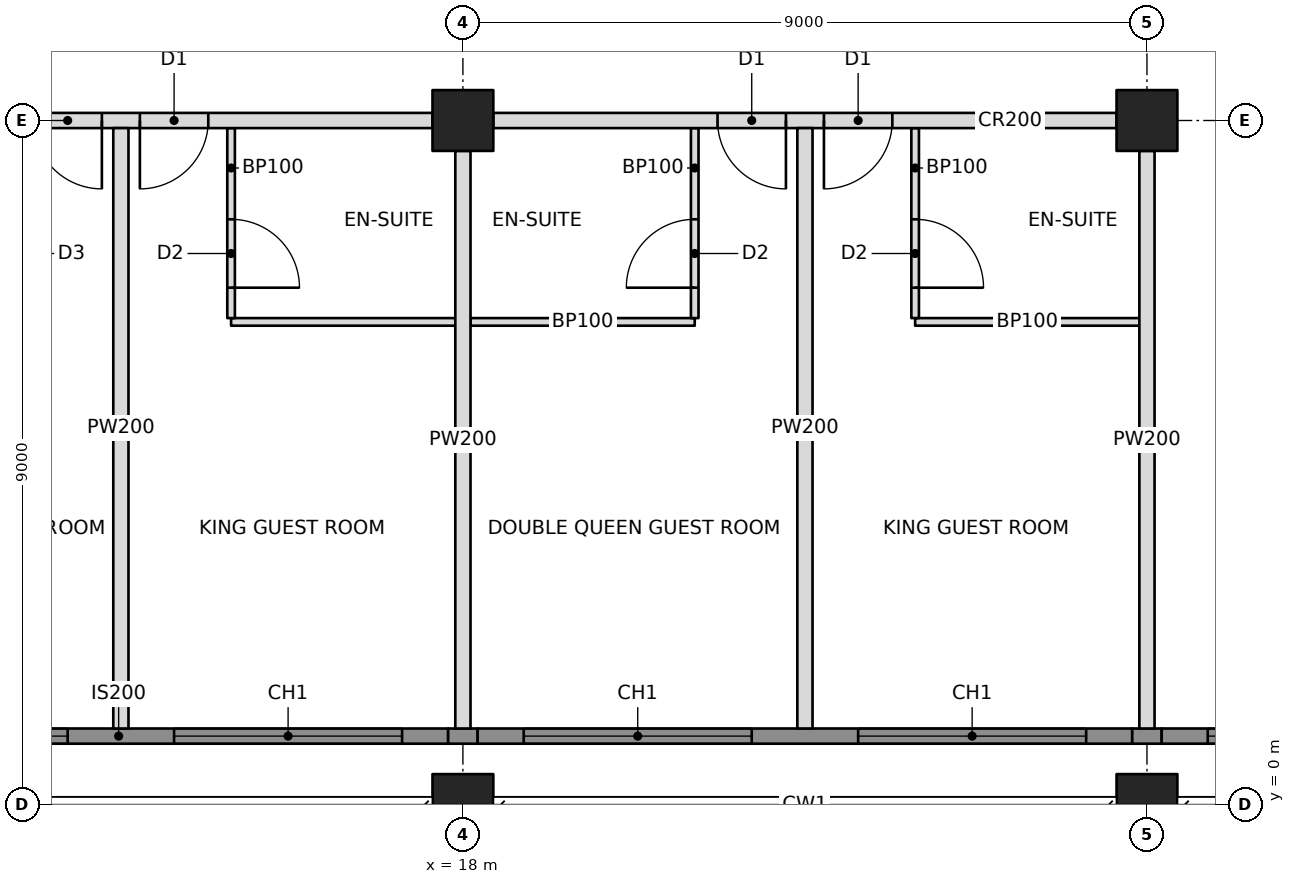
"""IFC4 building model, lengths in metres.
Left out: names, types, materials, properties, quantities, classifications, styles, units other than length and angle.
Written with IfcOpenShell. Run it as: python <this file> out.ifc"""

import sys

from ifc_helpers import new_model, si_unit, direction, frame, frame_2d, origin, origin_2d, place, context, subcontext, project, spatial, rectangle, hollow_rectangle, extrude, element, fill, save


model = new_model("IFC4")
c1 = context("Model", 3, precision=1e-05, world=origin(), true_north=direction((0.0, 1.0)))
c2 = subcontext(c1, "Body", "Model", "MODEL_VIEW")
j1 = project(units=[si_unit("LENGTHUNIT", "METRE"), si_unit("PLANEANGLEUNIT", "RADIAN")], contexts=[c1])
p1 = place(None, origin())
s1 = spatial("IfcSite", under=j1, at=p1, CompositionType="ELEMENT")
p2 = place(p1, origin())
s2 = spatial("IfcBuilding", under=s1, at=p2, CompositionType="ELEMENT")
p3 = place(p2, frame((0.0, 0.0, 167.2)))
s3 = spatial("IfcBuildingStorey", under=s2, at=p3, CompositionType="ELEMENT", Elevation=167.2)
p4 = place(p3, frame((18.0, 0.0, 0.0), z_axis=(0.0, 0.0, 1.0), x_axis=(1.0, 0.0, 0.0)))
e1 = element("IfcColumn", 1, at=p4, inside=s3, PredefinedType="COLUMN", context=c2, shape_type="SweptSolid", body=[
    extrude(hollow_rectangle(XDim=0.8, YDim=0.8, WallThickness=0.07, at=origin_2d()), origin(), (0.0, 0.0, 1.0), 3.4),
])
p5 = place(p3, frame((18.0, 9.0, 0.0), z_axis=(0.0, 0.0, 1.0), x_axis=(1.0, 0.0, 0.0)))
e2 = element("IfcColumn", 2, at=p5, inside=s3, PredefinedType="COLUMN", context=c2, shape_type="SweptSolid", body=[
    extrude(hollow_rectangle(XDim=0.8, YDim=0.8, WallThickness=0.06, at=origin_2d()), origin(), (0.0, 0.0, 1.0), 3.4),
])
p6 = place(p3, frame((27.0, 0.0, 0.0), z_axis=(0.0, 0.0, 1.0), x_axis=(1.0, 0.0, 0.0)))
e3 = element("IfcColumn", 3, at=p6, inside=s3, PredefinedType="COLUMN", context=c2, shape_type="SweptSolid", body=[
    extrude(hollow_rectangle(XDim=0.8, YDim=0.8, WallThickness=0.07, at=origin_2d()), origin(), (0.0, 0.0, 1.0), 3.4),
])
p7 = place(p3, frame((27.0, 9.0, 0.0), z_axis=(0.0, 0.0, 1.0), x_axis=(1.0, 0.0, 0.0)))
e4 = element("IfcColumn", 4, at=p7, inside=s3, PredefinedType="COLUMN", context=c2, shape_type="SweptSolid", body=[
    extrude(hollow_rectangle(XDim=0.8, YDim=0.8, WallThickness=0.06, at=origin_2d()), origin(), (0.0, 0.0, 1.0), 3.4),
])
p8 = place(p3, frame((9.4, 9.0, 0.0), z_axis=(0.0, 0.0, 1.0), x_axis=(1.0, 0.0, 0.0)))
e5 = element("IfcWall", 5, at=p8, inside=s3, PredefinedType="PARTITIONING", context=c2, shape_type="SweptSolid", body=[
    extrude(rectangle(XDim=8.2, YDim=0.2, at=frame_2d((4.1, 0.0))), origin(), (0.0, 0.0, 1.0), 2.405),
])
p9 = place(p8, frame((2.95, 0.0, 0.0)))
e6 = element("IfcOpeningElement", 6, at=p9, cuts=e5, PredefinedType="OPENING", context=c2, shape_type="SweptSolid", body=[
    extrude(rectangle(XDim=0.9, YDim=2.1, at=frame_2d((0.45, 1.05))), frame((0.0, 0.11, 0.0), z_axis=(0.0, -1.0, 0.0), x_axis=(1.0, 0.0, 0.0)), (0.0, 0.0, 1.0), 0.22),
])
p10 = place(p8, frame((4.35, 0.0, 0.0)))
e7 = element("IfcOpeningElement", 7, at=p10, cuts=e5, PredefinedType="OPENING", context=c2, shape_type="SweptSolid", body=[
    extrude(rectangle(XDim=0.9, YDim=2.1, at=frame_2d((0.45, 1.05))), frame((0.0, 0.11, 0.0), z_axis=(0.0, -1.0, 0.0), x_axis=(1.0, 0.0, 0.0)), (0.0, 0.0, 1.0), 0.22),
])
p11 = place(p3, frame((18.4, 9.0, 0.0), z_axis=(0.0, 0.0, 1.0), x_axis=(1.0, 0.0, 0.0)))
e8 = element("IfcWall", 8, at=p11, inside=s3, PredefinedType="PARTITIONING", context=c2, shape_type="SweptSolid", body=[
    extrude(rectangle(XDim=8.2, YDim=0.2, at=frame_2d((4.1, 0.0))), origin(), (0.0, 0.0, 1.0), 2.405),
])
p12 = place(p11, frame((2.95, 0.0, 0.0)))
e9 = element("IfcOpeningElement", 9, at=p12, cuts=e8, PredefinedType="OPENING", context=c2, shape_type="SweptSolid", body=[
    extrude(rectangle(XDim=0.9, YDim=2.1, at=frame_2d((0.45, 1.05))), frame((0.0, 0.11, 0.0), z_axis=(0.0, -1.0, 0.0), x_axis=(1.0, 0.0, 0.0)), (0.0, 0.0, 1.0), 0.22),
])
p13 = place(p11, frame((4.35, 0.0, 0.0)))
e10 = element("IfcOpeningElement", 10, at=p13, cuts=e8, PredefinedType="OPENING", context=c2, shape_type="SweptSolid", body=[
    extrude(rectangle(XDim=0.9, YDim=2.1, at=frame_2d((0.45, 1.05))), frame((0.0, 0.11, 0.0), z_axis=(0.0, -1.0, 0.0), x_axis=(1.0, 0.0, 0.0)), (0.0, 0.0, 1.0), 0.22),
])
p14 = place(p3, frame((13.5, 8.9, 0.0), z_axis=(0.0, 0.0, 1.0), x_axis=(0.0, -1.0, 0.0)))
e11 = element("IfcWall", 11, at=p14, inside=s3, PredefinedType="PARTITIONING", context=c2, shape_type="SweptSolid", body=[
    extrude(rectangle(XDim=7.9, YDim=0.2, at=frame_2d((3.95, 0.0))), origin(), (0.0, 0.0, 1.0), 2.404),
])
p15 = place(p3, frame((18.0, 8.6, 0.0), z_axis=(0.0, 0.0, 1.0), x_axis=(0.0, -1.0, 0.0)))
e12 = element("IfcWall", 12, at=p15, inside=s3, PredefinedType="PARTITIONING", context=c2, shape_type="SweptSolid", body=[
    extrude(rectangle(XDim=7.6, YDim=0.2, at=frame_2d((3.8, 0.0))), origin(), (0.0, 0.0, 1.0), 2.405),
])
p16 = place(p3, frame((22.5, 8.9, 0.0), z_axis=(0.0, 0.0, 1.0), x_axis=(0.0, -1.0, 0.0)))
e13 = element("IfcWall", 13, at=p16, inside=s3, PredefinedType="PARTITIONING", context=c2, shape_type="SweptSolid", body=[
    extrude(rectangle(XDim=7.9, YDim=0.2, at=frame_2d((3.95, 0.0))), origin(), (0.0, 0.0, 1.0), 2.404),
])
p17 = place(p3, frame((27.0, 8.6, 0.0), z_axis=(0.0, 0.0, 1.0), x_axis=(0.0, -1.0, 0.0)))
e14 = element("IfcWall", 14, at=p17, inside=s3, PredefinedType="PARTITIONING", context=c2, shape_type="SweptSolid", body=[
    extrude(rectangle(XDim=7.6, YDim=0.2, at=frame_2d((3.8, 0.0))), origin(), (0.0, 0.0, 1.0), 2.405),
])
p18 = place(p3, frame((14.95, 6.35, 0.0), z_axis=(0.0, 0.0, 1.0), x_axis=(1.0, 0.0, 0.0)))
e15 = element("IfcWall", 15, at=p18, inside=s3, PredefinedType="PARTITIONING", context=c2, shape_type="SweptSolid", body=[
    extrude(rectangle(XDim=2.95, YDim=0.1, at=frame_2d((1.475, 0.0))), origin(), (0.0, 0.0, 1.0), 2.404),
])
p19 = place(p3, frame((14.95, 8.9, 0.0), z_axis=(0.0, 0.0, 1.0), x_axis=(0.0, -1.0, 0.0)))
e16 = element("IfcWall", 16, at=p19, inside=s3, PredefinedType="PARTITIONING", context=c2, shape_type="SweptSolid", body=[
    extrude(rectangle(XDim=2.5, YDim=0.1, at=frame_2d((1.25, 0.0))), origin(), (0.0, 0.0, 1.0), 2.404),
])
p20 = place(p19, frame((1.2, 0.0, 0.0)))
e17 = element("IfcOpeningElement", 17, at=p20, cuts=e16, PredefinedType="OPENING", context=c2, shape_type="SweptSolid", body=[
    extrude(rectangle(XDim=0.9, YDim=2.1, at=frame_2d((0.45, 1.05))), frame((0.0, 0.06, 0.0), z_axis=(0.0, -1.0, 0.0), x_axis=(1.0, 0.0, 0.0)), (0.0, 0.0, 1.0), 0.12),
])
p21 = place(p3, frame((18.1, 6.35, 0.0), z_axis=(0.0, 0.0, 1.0), x_axis=(1.0, 0.0, 0.0)))
e18 = element("IfcWall", 18, at=p21, inside=s3, PredefinedType="PARTITIONING", context=c2, shape_type="SweptSolid", body=[
    extrude(rectangle(XDim=2.95, YDim=0.1, at=frame_2d((1.475, 0.0))), origin(), (0.0, 0.0, 1.0), 2.404),
])
p22 = place(p3, frame((21.05, 8.9, 0.0), z_axis=(0.0, 0.0, 1.0), x_axis=(0.0, -1.0, 0.0)))
e19 = element("IfcWall", 19, at=p22, inside=s3, PredefinedType="PARTITIONING", context=c2, shape_type="SweptSolid", body=[
    extrude(rectangle(XDim=2.5, YDim=0.1, at=frame_2d((1.25, 0.0))), origin(), (0.0, 0.0, 1.0), 2.404),
])
p23 = place(p22, frame((1.2, 0.0, 0.0)))
e20 = element("IfcOpeningElement", 20, at=p23, cuts=e19, PredefinedType="OPENING", context=c2, shape_type="SweptSolid", body=[
    extrude(rectangle(XDim=0.9, YDim=2.1, at=frame_2d((0.45, 1.05))), frame((0.0, 0.06, 0.0), z_axis=(0.0, -1.0, 0.0), x_axis=(1.0, 0.0, 0.0)), (0.0, 0.0, 1.0), 0.12),
])
p24 = place(p3, frame((23.95, 6.35, 0.0), z_axis=(0.0, 0.0, 1.0), x_axis=(1.0, 0.0, 0.0)))
e21 = element("IfcWall", 21, at=p24, inside=s3, PredefinedType="PARTITIONING", context=c2, shape_type="SweptSolid", body=[
    extrude(rectangle(XDim=2.95, YDim=0.1, at=frame_2d((1.475, 0.0))), origin(), (0.0, 0.0, 1.0), 2.404),
])
p25 = place(p3, frame((23.95, 8.9, 0.0), z_axis=(0.0, 0.0, 1.0), x_axis=(0.0, -1.0, 0.0)))
e22 = element("IfcWall", 22, at=p25, inside=s3, PredefinedType="PARTITIONING", context=c2, shape_type="SweptSolid", body=[
    extrude(rectangle(XDim=2.5, YDim=0.1, at=frame_2d((1.25, 0.0))), origin(), (0.0, 0.0, 1.0), 2.404),
])
p26 = place(p25, frame((1.2, 0.0, 0.0)))
e23 = element("IfcOpeningElement", 23, at=p26, cuts=e22, PredefinedType="OPENING", context=c2, shape_type="SweptSolid", body=[
    extrude(rectangle(XDim=0.9, YDim=2.1, at=frame_2d((0.45, 1.05))), frame((0.0, 0.06, 0.0), z_axis=(0.0, -1.0, 0.0), x_axis=(1.0, 0.0, 0.0)), (0.0, 0.0, 1.0), 0.12),
])
p27 = place(p3, frame((9.135, 0.9, 0.0), z_axis=(0.0, 0.0, 1.0), x_axis=(1.0, 0.0, 0.0)))
e24 = element("IfcWall", 24, at=p27, inside=s3, PredefinedType="SOLIDWALL", context=c2, shape_type="SweptSolid", body=[
    extrude(rectangle(XDim=8.671, YDim=0.2, at=frame_2d((4.335, 0.0))), origin(), (0.0, 0.0, 1.0), 3.2),
])
p28 = place(p27, frame((0.665, 0.0, 0.6)))
e25 = element("IfcOpeningElement", 25, at=p28, cuts=e24, PredefinedType="OPENING", context=c2, shape_type="SweptSolid", body=[
    extrude(rectangle(XDim=3.0, YDim=2.2, at=frame_2d((1.5, 1.1))), frame((0.0, 0.11, 0.0), z_axis=(0.0, -1.0, 0.0), x_axis=(1.0, 0.0, 0.0)), (0.0, 0.0, 1.0), 0.22),
])
p29 = place(p27, frame((5.065, 0.0, 0.6)))
e26 = element("IfcOpeningElement", 26, at=p29, cuts=e24, PredefinedType="OPENING", context=c2, shape_type="SweptSolid", body=[
    extrude(rectangle(XDim=3.0, YDim=2.2, at=frame_2d((1.5, 1.1))), frame((0.0, 0.11, 0.0), z_axis=(0.0, -1.0, 0.0), x_axis=(1.0, 0.0, 0.0)), (0.0, 0.0, 1.0), 0.22),
])
p30 = place(p3, frame((17.806, 0.9, 0.0), z_axis=(0.0, 0.0, 1.0), x_axis=(1.0, 0.0, 0.0)))
e27 = element("IfcWall", 27, at=p30, inside=s3, PredefinedType="SOLIDWALL", context=c2, shape_type="SweptSolid", body=[
    extrude(rectangle(XDim=0.388, YDim=0.2, at=frame_2d((0.194, 0.0))), origin(), (0.0, 0.0, 1.0), 2.404),
])
p31 = place(p3, frame((18.194, 0.9, 0.0), z_axis=(0.0, 0.0, 1.0), x_axis=(1.0, 0.0, 0.0)))
e28 = element("IfcWall", 28, at=p31, inside=s3, PredefinedType="SOLIDWALL", context=c2, shape_type="SweptSolid", body=[
    extrude(rectangle(XDim=8.612, YDim=0.2, at=frame_2d((4.306, 0.0))), origin(), (0.0, 0.0, 1.0), 3.2),
])
p32 = place(p31, frame((0.606, 0.0, 0.6)))
e29 = element("IfcOpeningElement", 29, at=p32, cuts=e28, PredefinedType="OPENING", context=c2, shape_type="SweptSolid", body=[
    extrude(rectangle(XDim=3.0, YDim=2.2, at=frame_2d((1.5, 1.1))), frame((0.0, 0.11, 0.0), z_axis=(0.0, -1.0, 0.0), x_axis=(1.0, 0.0, 0.0)), (0.0, 0.0, 1.0), 0.22),
])
p33 = place(p31, frame((5.006, 0.0, 0.6)))
e30 = element("IfcOpeningElement", 30, at=p33, cuts=e28, PredefinedType="OPENING", context=c2, shape_type="SweptSolid", body=[
    extrude(rectangle(XDim=3.0, YDim=2.2, at=frame_2d((1.5, 1.1))), frame((0.0, 0.11, 0.0), z_axis=(0.0, -1.0, 0.0), x_axis=(1.0, 0.0, 0.0)), (0.0, 0.0, 1.0), 0.22),
])
p34 = place(p3, frame((26.806, 0.9, 0.0), z_axis=(0.0, 0.0, 1.0), x_axis=(1.0, 0.0, 0.0)))
e31 = element("IfcWall", 31, at=p34, inside=s3, PredefinedType="SOLIDWALL", context=c2, shape_type="SweptSolid", body=[
    extrude(rectangle(XDim=0.388, YDim=0.2, at=frame_2d((0.194, 0.0))), origin(), (0.0, 0.0, 1.0), 2.404),
])
p35 = place(p3, frame((27.194, 0.9, 0.0), z_axis=(0.0, 0.0, 1.0), x_axis=(1.0, 0.0, 0.0)))
e32 = element("IfcWall", 32, at=p35, inside=s3, PredefinedType="SOLIDWALL", context=c2, shape_type="SweptSolid", body=[
    extrude(rectangle(XDim=8.671, YDim=0.2, at=frame_2d((4.335, 0.0))), origin(), (0.0, 0.0, 1.0), 3.2),
])
p36 = place(p35, frame((0.606, 0.0, 0.6)))
e33 = element("IfcOpeningElement", 33, at=p36, cuts=e32, PredefinedType="OPENING", context=c2, shape_type="SweptSolid", body=[
    extrude(rectangle(XDim=3.0, YDim=2.2, at=frame_2d((1.5, 1.1))), frame((0.0, 0.11, 0.0), z_axis=(0.0, -1.0, 0.0), x_axis=(1.0, 0.0, 0.0)), (0.0, 0.0, 1.0), 0.22),
])
p37 = place(p35, frame((5.006, 0.0, 0.6)))
e34 = element("IfcOpeningElement", 34, at=p37, cuts=e32, PredefinedType="OPENING", context=c2, shape_type="SweptSolid", body=[
    extrude(rectangle(XDim=3.0, YDim=2.2, at=frame_2d((1.5, 1.1))), frame((0.0, 0.11, 0.0), z_axis=(0.0, -1.0, 0.0), x_axis=(1.0, 0.0, 0.0)), (0.0, 0.0, 1.0), 0.22),
])
p38 = place(p28, origin())
e35 = element("IfcWindow", 35, at=p38, inside=s3, PartitioningType="TRIPLE_PANEL_VERTICAL", PredefinedType="WINDOW", context=c2, shape_type="SweptSolid", body=[
    extrude(rectangle(XDim=3.0, YDim=2.2, at=frame_2d((1.5, 1.1))), frame((0.0, 0.03, 0.0), z_axis=(0.0, -1.0, 0.0), x_axis=(1.0, 0.0, 0.0)), (0.0, 0.0, 1.0), 0.06),
])
fill(e25, e35)
p39 = place(p29, origin())
e36 = element("IfcWindow", 36, at=p39, inside=s3, PartitioningType="TRIPLE_PANEL_VERTICAL", PredefinedType="WINDOW", context=c2, shape_type="SweptSolid", body=[
    extrude(rectangle(XDim=3.0, YDim=2.2, at=frame_2d((1.5, 1.1))), frame((0.0, 0.03, 0.0), z_axis=(0.0, -1.0, 0.0), x_axis=(1.0, 0.0, 0.0)), (0.0, 0.0, 1.0), 0.06),
])
fill(e26, e36)
p40 = place(p32, origin())
e37 = element("IfcWindow", 37, at=p40, inside=s3, PartitioningType="TRIPLE_PANEL_VERTICAL", PredefinedType="WINDOW", context=c2, shape_type="SweptSolid", body=[
    extrude(rectangle(XDim=3.0, YDim=2.2, at=frame_2d((1.5, 1.1))), frame((0.0, 0.03, 0.0), z_axis=(0.0, -1.0, 0.0), x_axis=(1.0, 0.0, 0.0)), (0.0, 0.0, 1.0), 0.06),
])
fill(e29, e37)
p41 = place(p33, origin())
e38 = element("IfcWindow", 38, at=p41, inside=s3, PartitioningType="TRIPLE_PANEL_VERTICAL", PredefinedType="WINDOW", context=c2, shape_type="SweptSolid", body=[
    extrude(rectangle(XDim=3.0, YDim=2.2, at=frame_2d((1.5, 1.1))), frame((0.0, 0.03, 0.0), z_axis=(0.0, -1.0, 0.0), x_axis=(1.0, 0.0, 0.0)), (0.0, 0.0, 1.0), 0.06),
])
fill(e30, e38)
p42 = place(p36, origin())
e39 = element("IfcWindow", 39, at=p42, inside=s3, PartitioningType="TRIPLE_PANEL_VERTICAL", PredefinedType="WINDOW", context=c2, shape_type="SweptSolid", body=[
    extrude(rectangle(XDim=3.0, YDim=2.2, at=frame_2d((1.5, 1.1))), frame((0.0, 0.03, 0.0), z_axis=(0.0, -1.0, 0.0), x_axis=(1.0, 0.0, 0.0)), (0.0, 0.0, 1.0), 0.06),
])
fill(e33, e39)
p43 = place(p9, frame((0.9, 0.0, 0.0), z_axis=(0.0, 0.0, 1.0), x_axis=(-1.0, 0.0, 0.0)))
e40 = element("IfcDoor", 40, at=p43, inside=s3, OperationType="SINGLE_SWING_LEFT", PredefinedType="DOOR", context=c2, shape_type="SweptSolid", body=[
    extrude(rectangle(XDim=0.9, YDim=2.1, at=frame_2d((0.45, 1.05))), frame((0.0, 0.025, 0.0), z_axis=(0.0, -1.0, 0.0), x_axis=(1.0, 0.0, 0.0)), (0.0, 0.0, 1.0), 0.05),
])
fill(e6, e40)
p44 = place(p20, origin())
e41 = element("IfcDoor", 41, at=p44, inside=s3, OperationType="SINGLE_SWING_RIGHT", PredefinedType="DOOR", context=c2, shape_type="SweptSolid", body=[
    extrude(rectangle(XDim=0.9, YDim=2.1, at=frame_2d((0.45, 1.05))), frame((0.0, 0.025, 0.0), z_axis=(0.0, -1.0, 0.0), x_axis=(1.0, 0.0, 0.0)), (0.0, 0.0, 1.0), 0.05),
])
fill(e17, e41)
p45 = place(p10, frame((0.9, 0.0, 0.0), z_axis=(0.0, 0.0, 1.0), x_axis=(-1.0, 0.0, 0.0)))
e42 = element("IfcDoor", 42, at=p45, inside=s3, OperationType="SINGLE_SWING_RIGHT", PredefinedType="DOOR", context=c2, shape_type="SweptSolid", body=[
    extrude(rectangle(XDim=0.9, YDim=2.1, at=frame_2d((0.45, 1.05))), frame((0.0, 0.025, 0.0), z_axis=(0.0, -1.0, 0.0), x_axis=(1.0, 0.0, 0.0)), (0.0, 0.0, 1.0), 0.05),
])
fill(e7, e42)
p46 = place(p23, frame((0.9, 0.0, 0.0), z_axis=(0.0, 0.0, 1.0), x_axis=(-1.0, 0.0, 0.0)))
e43 = element("IfcDoor", 43, at=p46, inside=s3, OperationType="SINGLE_SWING_LEFT", PredefinedType="DOOR", context=c2, shape_type="SweptSolid", body=[
    extrude(rectangle(XDim=0.9, YDim=2.1, at=frame_2d((0.45, 1.05))), frame((0.0, 0.025, 0.0), z_axis=(0.0, -1.0, 0.0), x_axis=(1.0, 0.0, 0.0)), (0.0, 0.0, 1.0), 0.05),
])
fill(e20, e43)
p47 = place(p12, frame((0.9, 0.0, 0.0), z_axis=(0.0, 0.0, 1.0), x_axis=(-1.0, 0.0, 0.0)))
e44 = element("IfcDoor", 44, at=p47, inside=s3, OperationType="SINGLE_SWING_LEFT", PredefinedType="DOOR", context=c2, shape_type="SweptSolid", body=[
    extrude(rectangle(XDim=0.9, YDim=2.1, at=frame_2d((0.45, 1.05))), frame((0.0, 0.025, 0.0), z_axis=(0.0, -1.0, 0.0), x_axis=(1.0, 0.0, 0.0)), (0.0, 0.0, 1.0), 0.05),
])
fill(e9, e44)
p48 = place(p26, origin())
e45 = element("IfcDoor", 45, at=p48, inside=s3, OperationType="SINGLE_SWING_RIGHT", PredefinedType="DOOR", context=c2, shape_type="SweptSolid", body=[
    extrude(rectangle(XDim=0.9, YDim=2.1, at=frame_2d((0.45, 1.05))), frame((0.0, 0.025, 0.0), z_axis=(0.0, -1.0, 0.0), x_axis=(1.0, 0.0, 0.0)), (0.0, 0.0, 1.0), 0.05),
])
fill(e23, e45)
p49 = place(p13, frame((0.9, 0.0, 0.0), z_axis=(0.0, 0.0, 1.0), x_axis=(-1.0, 0.0, 0.0)))
e46 = element("IfcDoor", 46, at=p49, inside=s3, OperationType="SINGLE_SWING_RIGHT", PredefinedType="DOOR", context=c2, shape_type="SweptSolid", body=[
    extrude(rectangle(XDim=0.9, YDim=2.1, at=frame_2d((0.45, 1.05))), frame((0.0, 0.025, 0.0), z_axis=(0.0, -1.0, 0.0), x_axis=(1.0, 0.0, 0.0)), (0.0, 0.0, 1.0), 0.05),
])
fill(e10, e46)
save(model, sys.argv[1])
